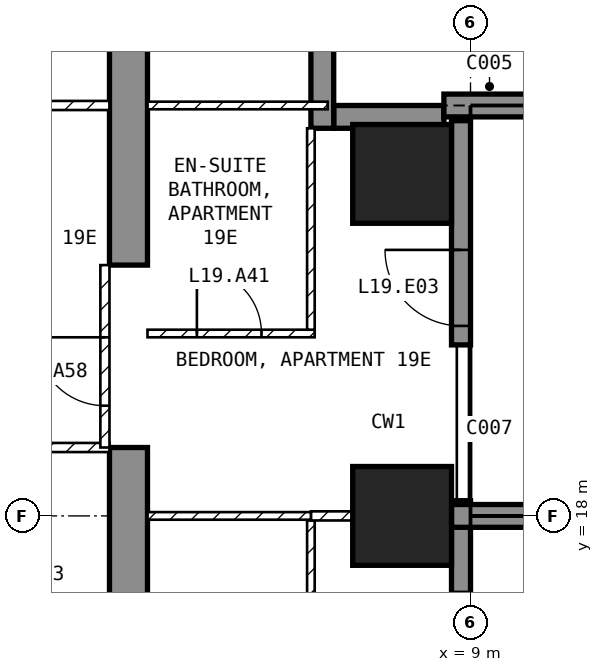
"""IFC4 building model, lengths in metres.
Left out: names, types, materials, properties, quantities, classifications, styles, units other than length and angle.
Written with IfcOpenShell. Run it as: python <this file> out.ifc"""

import sys

from ifc_helpers import new_model, si_unit, direction, frame, frame_2d, origin, origin_2d, place, context, subcontext, project, spatial, polyline, rectangle, outline, extrude, element, fill, save


model = new_model("IFC4")
c1 = context("Model", 3, precision=1e-05, world=origin(), true_north=direction((0.0, 1.0)))
c2 = subcontext(c1, "Body", "Model", "MODEL_VIEW")
j1 = project(units=[si_unit("LENGTHUNIT", "METRE"), si_unit("PLANEANGLEUNIT", "RADIAN")], contexts=[c1])
p1 = place(None, origin())
s1 = spatial("IfcSite", under=j1, at=p1, CompositionType="ELEMENT")
p2 = place(p1, origin())
s2 = spatial("IfcBuilding", under=s1, at=p2, CompositionType="ELEMENT")
p3 = place(p2, frame((0.0, 0.0, 85.5)))
s3 = spatial("IfcBuildingStorey", under=s2, at=p3, CompositionType="ELEMENT", Elevation=85.5)
for number, where, z_axis, x_axis in (
    (1, (8.1, 18.0, -0.25), (0.0, 0.0, 1.0), (1.0, 0.0, 0.0)),
    (2, (8.1, 22.5, -0.25), (0.0, 0.0, 1.0), (1.0, 0.0, 0.0)),
):
    element("IfcColumn", number, at=place(p3, frame(where, z_axis=z_axis, x_axis=x_axis)), inside=s3, PredefinedType="COLUMN", context=c2, shape_type="SweptSolid", body=[
        extrude(rectangle(XDim=1.3, YDim=1.3, at=origin_2d()), origin(), (0.0, 0.0, 1.0), 3.5),
    ])
p4 = place(p3, frame((4.25, 9.0, -0.25), z_axis=(1.0, 0.0, 0.0), x_axis=(0.0, 1.0, 0.0)))
e3 = element("IfcWall", 3, at=p4, inside=s3, PredefinedType="SHEAR", context=c2, shape_type="SweptSolid", body=[
    extrude(outline(polyline([(0.0, 0.0), (2.1, 0.0), (2.1, 2.65), (4.5, 2.65), (4.5, 0.0), (9.9, 0.0), (9.9, 2.65), (12.3, 2.65), (12.3, 0.0), (16.45, 0.0), (16.45, 3.5), (0.0, 3.5), (0.0, 0.0)])), origin(), (0.0, 0.0, 1.0), 0.5),
])
p5 = place(p3, frame((8.875, 15.55, 0.0), z_axis=(0.0, 0.0, 1.0), x_axis=(0.0, 1.0, 0.0)))
e4 = element("IfcWall", 4, at=p5, inside=s3, PredefinedType="SOLIDWALL", context=c2, shape_type="SweptSolid", body=[
    extrude(rectangle(XDim=2.65, YDim=0.25, at=frame_2d((1.325, 0.0))), origin(), (0.0, 0.0, 1.0), 3.25),
])
p6 = place(p5, frame((0.25, 0.0, 0.0)))
e5 = element("IfcOpeningElement", 5, at=p6, cuts=e4, PredefinedType="OPENING", context=c2, shape_type="SweptSolid", body=[
    extrude(rectangle(XDim=1.2, YDim=2.4, at=frame_2d((0.6, 1.2))), frame((0.0, 0.135, 0.0), z_axis=(0.0, -1.0, 0.0), x_axis=(1.0, 0.0, 0.0)), (0.0, 0.0, 1.0), 0.27),
])
p7 = place(p3, frame((8.875, 20.25, 0.0), z_axis=(0.0, 0.0, 1.0), x_axis=(0.0, 1.0, 0.0)))
e6 = element("IfcWall", 6, at=p7, inside=s3, PredefinedType="SOLIDWALL", context=c2, shape_type="SweptSolid", body=[
    extrude(rectangle(XDim=2.95, YDim=0.25, at=frame_2d((1.475, 0.0))), origin(), (0.0, 0.0, 1.0), 3.25),
])
p8 = place(p7, frame((0.25, 0.0, 0.0)))
e7 = element("IfcOpeningElement", 7, at=p8, cuts=e6, PredefinedType="OPENING", context=c2, shape_type="SweptSolid", body=[
    extrude(rectangle(XDim=1.0, YDim=2.4, at=frame_2d((0.5, 1.2))), frame((0.0, 0.135, 0.0), z_axis=(0.0, -1.0, 0.0), x_axis=(1.0, 0.0, 0.0)), (0.0, 0.0, 1.0), 0.27),
])
p9 = place(p3, frame((8.65, 23.25, 0.0), z_axis=(0.0, 0.0, 1.0), x_axis=(-1.0, 0.0, 0.0)))
e8 = element("IfcWall", 8, at=p9, inside=s3, PredefinedType="SOLIDWALL", context=c2, shape_type="SweptSolid", body=[
    extrude(rectangle(XDim=1.45, YDim=0.3, at=frame_2d((0.725, 0.0))), origin(), (0.0, 0.0, 1.0), 3.25),
])
p10 = place(p3, frame((7.05, 23.1, 0.0), z_axis=(0.0, 0.0, 1.0), x_axis=(0.0, 1.0, 0.0)))
e9 = element("IfcWall", 9, at=p10, inside=s3, PredefinedType="SOLIDWALL", context=c2, shape_type="SweptSolid", body=[
    extrude(rectangle(XDim=1.8, YDim=0.3, at=frame_2d((0.9, 0.0))), origin(), (0.0, 0.0, 1.0), 3.25),
])
p11 = place(p3, frame((8.75, 18.0, 0.0), z_axis=(0.0, 0.0, 1.0), x_axis=(1.0, 0.0, 0.0)))
e10 = element("IfcWall", 10, at=p11, inside=s3, PredefinedType="SOLIDWALL", context=c2, shape_type="SweptSolid", body=[
    extrude(rectangle(XDim=2.95, YDim=0.3, at=frame_2d((1.475, 0.0))), origin(), (0.0, 0.0, 1.0), 3.25),
])
p12 = place(p3, frame((8.65, 23.4, 0.0), z_axis=(0.0, 0.0, 1.0), x_axis=(1.0, 0.0, 0.0)))
e11 = element("IfcWall", 11, at=p12, inside=s3, PredefinedType="SOLIDWALL", context=c2, shape_type="SweptSolid", body=[
    extrude(rectangle(XDim=3.05, YDim=0.3, at=frame_2d((1.525, 0.0))), origin(), (0.0, 0.0, 1.0), 3.25),
])
p13 = place(p3, frame((-4.25, 18.9, 0.0), z_axis=(0.0, 0.0, 1.0), x_axis=(1.0, 0.0, 0.0)))
e12 = element("IfcWall", 12, at=p13, inside=s3, PredefinedType="PARTITIONING", context=c2, shape_type="SweptSolid", body=[
    extrude(rectangle(XDim=8.5, YDim=0.12, at=frame_2d((4.25, 0.0))), origin(), (0.0, 0.0, 1.0), 3.25),
])
p14 = place(p13, frame((1.925, 0.0, 0.0)))
e13 = element("IfcOpeningElement", 13, at=p14, cuts=e12, PredefinedType="OPENING", context=c2, shape_type="SweptSolid", body=[
    extrude(rectangle(XDim=0.9, YDim=2.1, at=frame_2d((0.45, 1.05))), frame((0.0, 0.07, 0.0), z_axis=(0.0, -1.0, 0.0), x_axis=(1.0, 0.0, 0.0)), (0.0, 0.0, 1.0), 0.14),
])
p15 = place(p3, frame((-4.25, 23.4, 0.0), z_axis=(0.0, 0.0, 1.0), x_axis=(1.0, 0.0, 0.0)))
e14 = element("IfcWall", 14, at=p15, inside=s3, PredefinedType="PARTITIONING", context=c2, shape_type="SweptSolid", body=[
    extrude(rectangle(XDim=8.5, YDim=0.12, at=frame_2d((4.25, 0.0))), origin(), (0.0, 0.0, 1.0), 3.25),
])
p16 = place(p15, frame((1.925, 0.0, 0.0)))
e15 = element("IfcOpeningElement", 15, at=p16, cuts=e14, PredefinedType="OPENING", context=c2, shape_type="SweptSolid", body=[
    extrude(rectangle(XDim=0.9, YDim=2.1, at=frame_2d((0.45, 1.05))), frame((0.0, 0.07, 0.0), z_axis=(0.0, -1.0, 0.0), x_axis=(1.0, 0.0, 0.0)), (0.0, 0.0, 1.0), 0.14),
])
p17 = place(p3, frame((6.9, 14.45, 0.0), z_axis=(0.0, 0.0, 1.0), x_axis=(0.0, 1.0, 0.0)))
e16 = element("IfcWall", 16, at=p17, inside=s3, PredefinedType="PARTITIONING", context=c2, shape_type="SweptSolid", body=[
    extrude(rectangle(XDim=3.49, YDim=0.1, at=frame_2d((1.745, 0.0))), origin(), (0.0, 0.0, 1.0), 3.25),
])
p18 = place(p3, frame((6.9, 18.0, 0.0), z_axis=(0.0, 0.0, 1.0), x_axis=(1.0, 0.0, 0.0)))
e17 = element("IfcWall", 17, at=p18, inside=s3, PredefinedType="PARTITIONING", context=c2, shape_type="SweptSolid", body=[
    extrude(rectangle(XDim=0.55, YDim=0.12, at=frame_2d((0.275, 0.0))), origin(), (0.0, 0.0, 1.0), 2.346),
])
p19 = place(p3, frame((4.75, 18.0, 0.0), z_axis=(0.0, 0.0, 1.0), x_axis=(1.0, 0.0, 0.0)))
e18 = element("IfcWall", 18, at=p19, inside=s3, PredefinedType="PARTITIONING", context=c2, shape_type="SweptSolid", body=[
    extrude(rectangle(XDim=2.15, YDim=0.1, at=frame_2d((1.075, 0.0))), origin(), (0.0, 0.0, 1.0), 2.346),
])
p20 = place(p3, frame((4.75, 20.4, 0.0), z_axis=(0.0, 0.0, 1.0), x_axis=(1.0, 0.0, 0.0)))
e19 = element("IfcWall", 19, at=p20, inside=s3, PredefinedType="PARTITIONING", context=c2, shape_type="SweptSolid", body=[
    extrude(rectangle(XDim=2.2, YDim=0.1, at=frame_2d((1.1, 0.0))), origin(), (0.0, 0.0, 1.0), 3.25),
])
p21 = place(p20, frame((0.65, 0.0, 0.0)))
e20 = element("IfcOpeningElement", 20, at=p21, cuts=e19, PredefinedType="OPENING", context=c2, shape_type="SweptSolid", body=[
    extrude(rectangle(XDim=0.85, YDim=2.1, at=frame_2d((0.425, 1.05))), frame((0.0, 0.06, 0.0), z_axis=(0.0, -1.0, 0.0), x_axis=(1.0, 0.0, 0.0)), (0.0, 0.0, 1.0), 0.12),
])
p22 = place(p3, frame((6.9, 20.45, 0.0), z_axis=(0.0, 0.0, 1.0), x_axis=(0.0, 1.0, 0.0)))
e21 = element("IfcWall", 21, at=p22, inside=s3, PredefinedType="PARTITIONING", context=c2, shape_type="SweptSolid", body=[
    extrude(rectangle(XDim=2.65, YDim=0.1, at=frame_2d((1.325, 0.0))), origin(), (0.0, 0.0, 1.0), 3.25),
])
p23 = place(p3, frame((4.75, 23.4, 0.0), z_axis=(0.0, 0.0, 1.0), x_axis=(1.0, 0.0, 0.0)))
e22 = element("IfcWall", 22, at=p23, inside=s3, PredefinedType="PARTITIONING", context=c2, shape_type="SweptSolid", body=[
    extrude(rectangle(XDim=2.37, YDim=0.1, at=frame_2d((1.185, 0.0))), origin(), (0.0, 0.0, 1.0), 3.25),
])
p24 = place(p3, frame((4.19, 18.9, 0.0), z_axis=(0.0, 0.0, 1.0), x_axis=(0.0, 1.0, 0.0)))
e23 = element("IfcWall", 23, at=p24, inside=s3, PredefinedType="PARTITIONING", context=c2, shape_type="SweptSolid", body=[
    extrude(rectangle(XDim=2.4, YDim=0.12, at=frame_2d((1.2, 0.0))), origin(), (0.0, 0.0, 1.0), 2.4),
])
p25 = place(p24, frame((0.55, 0.0, 0.0)))
e24 = element("IfcOpeningElement", 24, at=p25, cuts=e23, PredefinedType="OPENING", context=c2, shape_type="SweptSolid", body=[
    extrude(rectangle(XDim=0.9, YDim=2.1, at=frame_2d((0.45, 1.05))), frame((0.0, 0.07, 0.0), z_axis=(0.0, -1.0, 0.0), x_axis=(1.0, 0.0, 0.0)), (0.0, 0.0, 1.0), 0.14),
])
p26 = place(p6, origin())
e25 = element("IfcDoor", 25, at=p26, inside=s3, OperationType="SINGLE_SWING_LEFT", PredefinedType="DOOR", context=c2, shape_type="SweptSolid", body=[
    extrude(rectangle(XDim=1.2, YDim=2.4, at=frame_2d((0.6, 1.2))), frame((0.0, 0.025, 0.0), z_axis=(0.0, -1.0, 0.0), x_axis=(1.0, 0.0, 0.0)), (0.0, 0.0, 1.0), 0.05),
])
fill(e5, e25)
p27 = place(p8, origin())
e26 = element("IfcDoor", 26, at=p27, inside=s3, OperationType="SINGLE_SWING_RIGHT", PredefinedType="DOOR", context=c2, shape_type="SweptSolid", body=[
    extrude(rectangle(XDim=1.0, YDim=2.4, at=frame_2d((0.5, 1.2))), frame((0.0, 0.025, 0.0), z_axis=(0.0, -1.0, 0.0), x_axis=(1.0, 0.0, 0.0)), (0.0, 0.0, 1.0), 0.05),
])
fill(e7, e26)
p28 = place(p21, origin())
e27 = element("IfcDoor", 27, at=p28, inside=s3, OperationType="SINGLE_SWING_LEFT", PredefinedType="DOOR", context=c2, shape_type="SweptSolid", body=[
    extrude(rectangle(XDim=0.85, YDim=2.1, at=frame_2d((0.425, 1.05))), frame((0.0, 0.025, 0.0), z_axis=(0.0, -1.0, 0.0), x_axis=(1.0, 0.0, 0.0)), (0.0, 0.0, 1.0), 0.05),
])
fill(e20, e27)
p29 = place(p25, origin())
e28 = element("IfcDoor", 28, at=p29, inside=s3, OperationType="SINGLE_SWING_RIGHT", PredefinedType="DOOR", context=c2, shape_type="SweptSolid", body=[
    extrude(rectangle(XDim=0.9, YDim=2.1, at=frame_2d((0.45, 1.05))), frame((0.0, 0.025, 0.0), z_axis=(0.0, -1.0, 0.0), x_axis=(1.0, 0.0, 0.0)), (0.0, 0.0, 1.0), 0.05),
])
fill(e24, e28)
save(model, sys.argv[1])
